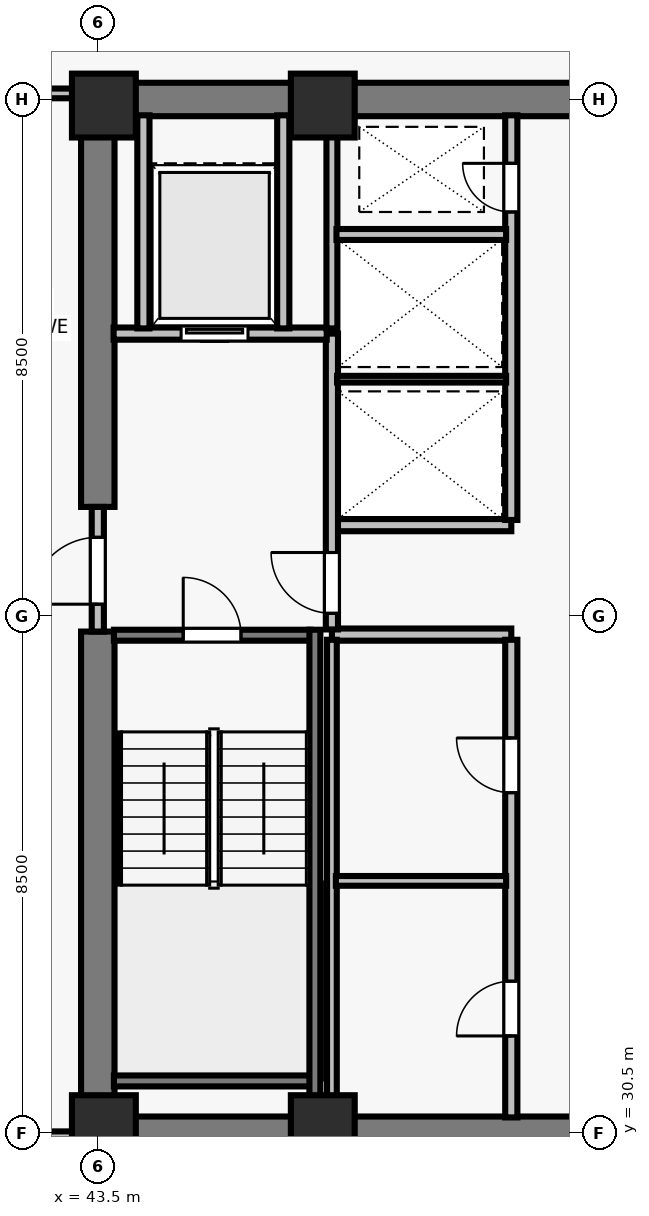
"""IFC4 building model, lengths in metres.
Left out: names, types, materials, properties, quantities, classifications, styles, units other than length and angle.
Written with IfcOpenShell. Run it as: python <this file> out.ifc"""

import sys

from ifc_helpers import new_model, si_unit, direction, frame, frame_2d, origin, origin_2d, place, context, subcontext, project, spatial, rectangle, extrude, element, fill, save


model = new_model("IFC4")
c1 = context("Model", 3, precision=1e-05, world=origin(), true_north=direction((0.0, 1.0)))
c2 = subcontext(c1, "Body", "Model", "MODEL_VIEW")
j1 = project(units=[si_unit("LENGTHUNIT", "METRE"), si_unit("PLANEANGLEUNIT", "RADIAN")], contexts=[c1])
p1 = place(None, origin())
s1 = spatial("IfcSite", under=j1, at=p1, CompositionType="ELEMENT")
p2 = place(p1, origin())
s2 = spatial("IfcBuilding", under=s1, at=p2, CompositionType="ELEMENT")
p3 = place(p2, frame((0.0, 0.0, 127.0)))
s3 = spatial("IfcBuildingStorey", under=s2, at=p3, CompositionType="ELEMENT", Elevation=127.0)
for number, where, z_axis, x_axis in (
    (1, (43.6, 30.6, 0.0), (0.0, 0.0, 1.0), (1.0, 0.0, 0.0)),
    (2, (47.2, 30.6, 0.0), (0.0, 0.0, 1.0), (1.0, 0.0, 0.0)),
    (3, (43.6, 47.4, 0.0), (0.0, 0.0, 1.0), (1.0, 0.0, 0.0)),
    (4, (47.2, 47.4, 0.0), (0.0, 0.0, 1.0), (1.0, 0.0, 0.0)),
):
    element("IfcColumn", number, at=place(p3, frame(where, z_axis=z_axis, x_axis=x_axis)), inside=s3, PredefinedType="COLUMN", context=c2, shape_type="SweptSolid", body=[
        extrude(rectangle(XDim=1.05, YDim=1.05, at=origin_2d()), origin(), (0.0, 0.0, 1.0), 3.5),
    ])
for number, where, z_axis, x_axis in (
    (5, (43.225, 30.5, 0.0), (0.0, 0.0, 1.0), (1.0, 0.0, 0.0)),
    (6, (43.225, 47.5, 0.0), (0.0, 0.0, 1.0), (1.0, 0.0, 0.0)),
):
    element("IfcWall", number, at=place(p3, frame(where, z_axis=z_axis, x_axis=x_axis)), inside=s3, PredefinedType="SHEAR", context=c2, shape_type="SweptSolid", body=[
        extrude(rectangle(XDim=17.55, YDim=0.55, at=frame_2d((8.775, 0.0))), origin(), (0.0, 0.0, 1.0), 3.28),
    ])
p4 = place(p3, frame((43.5, 30.765, 0.0), z_axis=(0.0, 0.0, 1.0), x_axis=(0.0, 1.0, 0.0)))
e7 = element("IfcWall", 7, at=p4, inside=s3, PredefinedType="SHEAR", context=c2, shape_type="SweptSolid", body=[
    extrude(rectangle(XDim=7.985, YDim=0.55, at=frame_2d((3.993, 0.0))), origin(), (0.0, 0.0, 1.0), 3.28),
])
p5 = place(p3, frame((43.5, 40.8, 0.0), z_axis=(0.0, 0.0, 1.0), x_axis=(0.0, 1.0, 0.0)))
e8 = element("IfcWall", 8, at=p5, inside=s3, PredefinedType="SHEAR", context=c2, shape_type="SweptSolid", body=[
    extrude(rectangle(XDim=6.435, YDim=0.55, at=frame_2d((3.218, 0.0))), origin(), (0.0, 0.0, 1.0), 3.28),
])
for number, where, z_axis, x_axis in (
    (9, (47.35, 38.7, 0.0), (0.0, 0.0, 1.0), (1.0, 0.0, 0.0)),
    (10, (47.35, 40.5, 0.0), (0.0, 0.0, 1.0), (1.0, 0.0, 0.0)),
):
    element("IfcWall", number, at=place(p3, frame(where, z_axis=z_axis, x_axis=x_axis)), inside=s3, PredefinedType="SOLIDWALL", context=c2, shape_type="SweptSolid", body=[
        extrude(rectangle(XDim=2.95, YDim=0.2, at=frame_2d((1.475, 0.0))), origin(), (0.0, 0.0, 1.0), 3.28),
    ])
p6 = place(p3, frame((50.3, 30.76, 0.0), z_axis=(0.0, 0.0, 1.0), x_axis=(0.0, 1.0, 0.0)))
e11 = element("IfcWall", 11, at=p6, inside=s3, PredefinedType="SOLIDWALL", context=c2, shape_type="SweptSolid", body=[
    extrude(rectangle(XDim=7.855, YDim=0.2, at=frame_2d((3.927, 0.0))), origin(), (0.0, 0.0, 1.0), 3.28),
])
p7 = place(p6, frame((1.34, 0.0, 0.0)))
e12 = element("IfcOpeningElement", 12, at=p7, cuts=e11, PredefinedType="OPENING", context=c2, shape_type="SweptSolid", body=[
    extrude(rectangle(XDim=0.9, YDim=2.12, at=frame_2d((0.45, 1.06))), frame((0.0, 0.11, 0.0), z_axis=(0.0, -1.0, 0.0), x_axis=(1.0, 0.0, 0.0)), (0.0, 0.0, 1.0), 0.22),
])
p8 = place(p6, frame((5.34, 0.0, 0.0)))
e13 = element("IfcOpeningElement", 13, at=p8, cuts=e11, PredefinedType="OPENING", context=c2, shape_type="SweptSolid", body=[
    extrude(rectangle(XDim=0.9, YDim=2.12, at=frame_2d((0.45, 1.06))), frame((0.0, 0.11, 0.0), z_axis=(0.0, -1.0, 0.0), x_axis=(1.0, 0.0, 0.0)), (0.0, 0.0, 1.0), 0.22),
])
p9 = place(p3, frame((50.3, 40.585, 0.0), z_axis=(0.0, 0.0, 1.0), x_axis=(0.0, 1.0, 0.0)))
e14 = element("IfcWall", 14, at=p9, inside=s3, PredefinedType="SOLIDWALL", context=c2, shape_type="SweptSolid", body=[
    extrude(rectangle(XDim=6.655, YDim=0.2, at=frame_2d((3.328, 0.0))), origin(), (0.0, 0.0, 1.0), 3.28),
])
p10 = place(p9, frame((5.065, 0.0, 0.0)))
e15 = element("IfcOpeningElement", 15, at=p10, cuts=e14, PredefinedType="OPENING", context=c2, shape_type="SweptSolid", body=[
    extrude(rectangle(XDim=0.8, YDim=2.08, at=frame_2d((0.4, 1.04))), frame((0.0, 0.11, 0.0), z_axis=(0.0, -1.0, 0.0), x_axis=(1.0, 0.0, 0.0)), (0.0, 0.0, 1.0), 0.22),
])
p11 = place(p3, frame((43.5, 38.75, 0.0), z_axis=(0.0, 0.0, 1.0), x_axis=(0.0, 1.0, 0.0)))
e16 = element("IfcWall", 16, at=p11, inside=s3, PredefinedType="SOLIDWALL", context=c2, shape_type="SweptSolid", body=[
    extrude(rectangle(XDim=2.05, YDim=0.2, at=frame_2d((1.025, 0.0))), origin(), (0.0, 0.0, 1.0), 3.28),
])
p12 = place(p11, frame((0.45, 0.0, 0.0)))
e17 = element("IfcOpeningElement", 17, at=p12, cuts=e16, PredefinedType="OPENING", context=c2, shape_type="SweptSolid", body=[
    extrude(rectangle(XDim=1.1, YDim=2.15, at=frame_2d((0.55, 1.075))), frame((0.0, 0.11, 0.0), z_axis=(0.0, -1.0, 0.0), x_axis=(1.0, 0.0, 0.0)), (0.0, 0.0, 1.0), 0.22),
])
p13 = place(p3, frame((47.35, 38.785, 0.0), z_axis=(0.0, 0.0, 1.0), x_axis=(0.0, 1.0, 0.0)))
e18 = element("IfcWall", 18, at=p13, inside=s3, PredefinedType="SOLIDWALL", context=c2, shape_type="SweptSolid", body=[
    extrude(rectangle(XDim=4.865, YDim=0.2, at=frame_2d((2.433, 0.0))), origin(), (0.0, 0.0, 1.0), 3.28),
])
p14 = place(p13, frame((0.265, 0.0, 0.0)))
e19 = element("IfcOpeningElement", 19, at=p14, cuts=e18, PredefinedType="OPENING", context=c2, shape_type="SweptSolid", body=[
    extrude(rectangle(XDim=1.0, YDim=2.15, at=frame_2d((0.5, 1.075))), frame((0.0, 0.11, 0.0), z_axis=(0.0, -1.0, 0.0), x_axis=(1.0, 0.0, 0.0)), (0.0, 0.0, 1.0), 0.22),
])
p15 = place(p3, frame((43.76, 43.65, 0.0), z_axis=(0.0, 0.0, 1.0), x_axis=(1.0, 0.0, 0.0)))
e20 = element("IfcWall", 20, at=p15, inside=s3, PredefinedType="SOLIDWALL", context=c2, shape_type="SweptSolid", body=[
    extrude(rectangle(XDim=3.505, YDim=0.2, at=frame_2d((1.752, 0.0))), origin(), (0.0, 0.0, 1.0), 3.28),
])
p16 = place(p15, frame((1.11, 0.0, 0.0)))
e21 = element("IfcOpeningElement", 21, at=p16, cuts=e20, PredefinedType="OPENING", context=c2, shape_type="SweptSolid", body=[
    extrude(rectangle(XDim=1.1, YDim=2.2, at=frame_2d((0.55, 1.1))), frame((0.0, 0.11, 0.0), z_axis=(0.0, -1.0, 0.0), x_axis=(1.0, 0.0, 0.0)), (0.0, 0.0, 1.0), 0.22),
])
for number, where, z_axis, x_axis in (
    (22, (46.55, 43.735, 0.0), (0.0, 0.0, 1.0), (0.0, 1.0, 0.0)),
    (23, (44.25, 43.735, 0.0), (0.0, 0.0, 1.0), (0.0, 1.0, 0.0)),
):
    element("IfcWall", number, at=place(p3, frame(where, z_axis=z_axis, x_axis=x_axis)), inside=s3, PredefinedType="SOLIDWALL", context=c2, shape_type="SweptSolid", body=[
        extrude(rectangle(XDim=3.505, YDim=0.2, at=frame_2d((1.752, 0.0))), origin(), (0.0, 0.0, 1.0), 3.28),
    ])
p17 = place(p3, frame((47.35, 30.76, 0.0), z_axis=(0.0, 0.0, 1.0), x_axis=(0.0, 1.0, 0.0)))
e24 = element("IfcWall", 24, at=p17, inside=s3, PredefinedType="PARTITIONING", context=c2, shape_type="SweptSolid", body=[
    extrude(rectangle(XDim=7.855, YDim=0.16, at=frame_2d((3.927, 0.0))), origin(), (0.0, 0.0, 1.0), 3.28),
])
p18 = place(p3, frame((47.415, 34.65, 0.0), z_axis=(0.0, 0.0, 1.0), x_axis=(1.0, 0.0, 0.0)))
e25 = element("IfcWall", 25, at=p18, inside=s3, PredefinedType="PARTITIONING", context=c2, shape_type="SweptSolid", body=[
    extrude(rectangle(XDim=2.8, YDim=0.16, at=frame_2d((1.4, 0.0))), origin(), (0.0, 0.0, 1.0), 3.28),
])
p19 = place(p3, frame((47.35, 43.735, 0.0), z_axis=(0.0, 0.0, 1.0), x_axis=(0.0, 1.0, 0.0)))
e26 = element("IfcWall", 26, at=p19, inside=s3, PredefinedType="SOLIDWALL", context=c2, shape_type="SweptSolid", body=[
    extrude(rectangle(XDim=3.505, YDim=0.18, at=frame_2d((1.752, 0.0))), origin(), (0.0, 0.0, 1.0), 3.28),
])
p20 = place(p3, frame((47.435, 42.9, 0.0), z_axis=(0.0, 0.0, 1.0), x_axis=(1.0, 0.0, 0.0)))
e27 = element("IfcWall", 27, at=p20, inside=s3, PredefinedType="PARTITIONING", context=c2, shape_type="SweptSolid", body=[
    extrude(rectangle(XDim=2.78, YDim=0.11, at=frame_2d((1.39, 0.0))), origin(), (0.0, 0.0, 1.0), 3.28),
])
p21 = place(p3, frame((47.425, 45.28, 0.0), z_axis=(0.0, 0.0, 1.0), x_axis=(1.0, 0.0, 0.0)))
e28 = element("IfcWall", 28, at=p21, inside=s3, PredefinedType="SOLIDWALL", context=c2, shape_type="SweptSolid", body=[
    extrude(rectangle(XDim=2.79, YDim=0.18, at=frame_2d((1.395, 0.0))), origin(), (0.0, 0.0, 1.0), 3.28),
])
p22 = place(p3, frame((41.55, 30.45, 0.0), z_axis=(0.0, 0.0, 1.0), x_axis=(1.0, 0.0, 0.0)))
e29 = element("IfcWall", 29, at=p22, inside=s3, PredefinedType="PARTITIONING", context=c2, shape_type="SweptSolid", body=[
    extrude(rectangle(XDim=1.685, YDim=0.16, at=frame_2d((0.843, 0.0))), origin(), (0.0, 0.0, 1.0), 3.28),
])
p23 = place(p3, frame((41.615, 47.6, 0.0), z_axis=(0.0, 0.0, 1.0), x_axis=(1.0, 0.0, 0.0)))
e30 = element("IfcWall", 30, at=p23, inside=s3, PredefinedType="PARTITIONING", context=c2, shape_type="SweptSolid", body=[
    extrude(rectangle(XDim=1.62, YDim=0.16, at=frame_2d((0.81, 0.0))), origin(), (0.0, 0.0, 1.0), 3.28),
])
p24 = place(p3, frame((43.765, 38.69, 0.0), z_axis=(0.0, 0.0, 1.0), x_axis=(1.0, 0.0, 0.0)))
e31 = element("IfcWall", 31, at=p24, inside=s3, PredefinedType="SOLIDWALL", context=c2, shape_type="SweptSolid", body=[
    extrude(rectangle(XDim=3.23, YDim=0.18, at=frame_2d((1.615, 0.0))), origin(), (0.0, 0.0, 1.0), 3.28),
])
p25 = place(p24, frame((1.14, 0.0, 0.0)))
e32 = element("IfcOpeningElement", 32, at=p25, cuts=e31, PredefinedType="OPENING", context=c2, shape_type="SweptSolid", body=[
    extrude(rectangle(XDim=0.95, YDim=2.15, at=frame_2d((0.475, 1.075))), frame((0.0, 0.1, 0.0), z_axis=(0.0, -1.0, 0.0), x_axis=(1.0, 0.0, 0.0)), (0.0, 0.0, 1.0), 0.2),
])
p26 = place(p3, frame((43.765, 31.36, 0.0), z_axis=(0.0, 0.0, 1.0), x_axis=(1.0, 0.0, 0.0)))
e33 = element("IfcWall", 33, at=p26, inside=s3, PredefinedType="SOLIDWALL", context=c2, shape_type="SweptSolid", body=[
    extrude(rectangle(XDim=3.23, YDim=0.18, at=frame_2d((1.615, 0.0))), origin(), (0.0, 0.0, 1.0), 3.28),
])
p27 = place(p3, frame((47.07, 38.78, 0.0), z_axis=(0.0, 0.0, 1.0), x_axis=(0.0, -1.0, 0.0)))
e34 = element("IfcWall", 34, at=p27, inside=s3, PredefinedType="SOLIDWALL", context=c2, shape_type="SweptSolid", body=[
    extrude(rectangle(XDim=8.017, YDim=0.18, at=frame_2d((4.009, 0.0))), origin(), (0.0, 0.0, 1.0), 3.28),
])
p28 = place(p12, origin())
e35 = element("IfcDoor", 35, at=p28, inside=s3, OperationType="SINGLE_SWING_LEFT", PredefinedType="DOOR", context=c2, shape_type="SweptSolid", body=[
    extrude(rectangle(XDim=1.1, YDim=2.15, at=frame_2d((0.55, 1.075))), frame((0.0, 0.025, 0.0), z_axis=(0.0, -1.0, 0.0), x_axis=(1.0, 0.0, 0.0)), (0.0, 0.0, 1.0), 0.05),
])
fill(e17, e35)
p29 = place(p14, origin())
e36 = element("IfcDoor", 36, at=p29, inside=s3, OperationType="SINGLE_SWING_RIGHT", PredefinedType="DOOR", context=c2, shape_type="SweptSolid", body=[
    extrude(rectangle(XDim=1.0, YDim=2.15, at=frame_2d((0.5, 1.075))), frame((0.0, 0.025, 0.0), z_axis=(0.0, -1.0, 0.0), x_axis=(1.0, 0.0, 0.0)), (0.0, 0.0, 1.0), 0.05),
])
fill(e19, e36)
p30 = place(p16, origin())
e37 = element("IfcDoor", 37, at=p30, inside=s3, OperationType="SLIDING_TO_LEFT", PredefinedType="DOOR", context=c2, shape_type="SweptSolid", body=[
    extrude(rectangle(XDim=1.1, YDim=2.2, at=frame_2d((0.55, 1.1))), frame((0.0, 0.025, 0.0), z_axis=(0.0, -1.0, 0.0), x_axis=(1.0, 0.0, 0.0)), (0.0, 0.0, 1.0), 0.05),
])
fill(e21, e37)
p31 = place(p7, origin())
e38 = element("IfcDoor", 38, at=p31, inside=s3, OperationType="SINGLE_SWING_LEFT", PredefinedType="DOOR", context=c2, shape_type="SweptSolid", body=[
    extrude(rectangle(XDim=0.9, YDim=2.12, at=frame_2d((0.45, 1.06))), frame((0.0, 0.025, 0.0), z_axis=(0.0, -1.0, 0.0), x_axis=(1.0, 0.0, 0.0)), (0.0, 0.0, 1.0), 0.05),
])
fill(e12, e38)
p32 = place(p8, origin())
e39 = element("IfcDoor", 39, at=p32, inside=s3, OperationType="SINGLE_SWING_RIGHT", PredefinedType="DOOR", context=c2, shape_type="SweptSolid", body=[
    extrude(rectangle(XDim=0.9, YDim=2.12, at=frame_2d((0.45, 1.06))), frame((0.0, 0.025, 0.0), z_axis=(0.0, -1.0, 0.0), x_axis=(1.0, 0.0, 0.0)), (0.0, 0.0, 1.0), 0.05),
])
fill(e13, e39)
p33 = place(p10, origin())
e40 = element("IfcDoor", 40, at=p33, inside=s3, OperationType="SINGLE_SWING_RIGHT", PredefinedType="DOOR", context=c2, shape_type="SweptSolid", body=[
    extrude(rectangle(XDim=0.8, YDim=2.08, at=frame_2d((0.4, 1.04))), frame((0.0, 0.025, 0.0), z_axis=(0.0, -1.0, 0.0), x_axis=(1.0, 0.0, 0.0)), (0.0, 0.0, 1.0), 0.05),
])
fill(e15, e40)
p34 = place(p25, origin())
e41 = element("IfcDoor", 41, at=p34, inside=s3, OperationType="SINGLE_SWING_LEFT", PredefinedType="DOOR", context=c2, shape_type="SweptSolid", body=[
    extrude(rectangle(XDim=0.95, YDim=2.15, at=frame_2d((0.475, 1.075))), frame((0.0, 0.025, 0.0), z_axis=(0.0, -1.0, 0.0), x_axis=(1.0, 0.0, 0.0)), (0.0, 0.0, 1.0), 0.05),
])
fill(e32, e41)
save(model, sys.argv[1])
